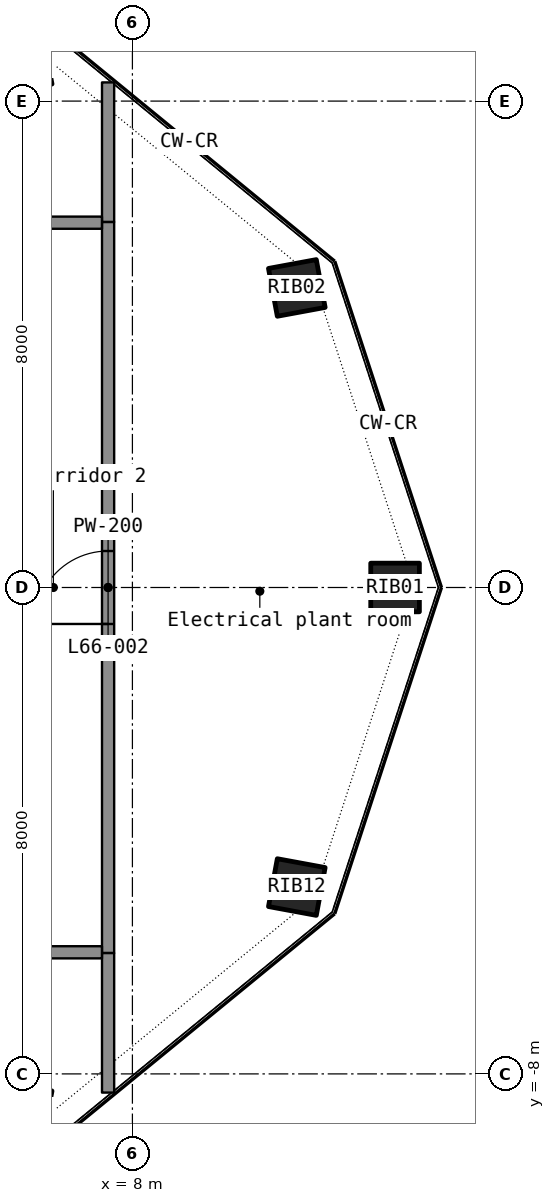
"""IFC4 building model, lengths in metres.
Left out: names, types, materials, properties, quantities, classifications, styles, units other than length and angle.
Written with IfcOpenShell. Run it as: python <this file> out.ifc"""

import sys

from ifc_helpers import new_model, si_unit, direction, frame, frame_2d, origin, origin_2d, place, context, subcontext, project, spatial, rectangle, hollow_rectangle, extrude, element, fill, save


model = new_model("IFC4")
c1 = context("Model", 3, precision=1e-05, world=origin(), true_north=direction((0.0, 1.0)))
c2 = subcontext(c1, "Body", "Model", "MODEL_VIEW")
j1 = project(units=[si_unit("LENGTHUNIT", "METRE"), si_unit("PLANEANGLEUNIT", "RADIAN")], contexts=[c1])
p1 = place(None, origin())
s1 = spatial("IfcSite", under=j1, at=p1, CompositionType="ELEMENT")
p2 = place(p1, origin())
s2 = spatial("IfcBuilding", under=s1, at=p2, CompositionType="ELEMENT")
p3 = place(p2, frame((0.0, 0.0, 272.6)))
s3 = spatial("IfcBuildingStorey", under=s2, at=p3, CompositionType="ELEMENT", Elevation=272.6)
p4 = place(p3, frame((12.32, 0.0, 0.0), z_axis=(-0.136861927, 0.0, 0.990590134), x_axis=(0.0, -1.0, 0.0)))
e1 = element("IfcColumn", 1, at=p4, inside=s3, PredefinedType="COLUMN", context=c2, shape_type="SweptSolid", body=[
    extrude(hollow_rectangle(XDim=0.8, YDim=0.8, WallThickness=0.025, at=origin_2d()), origin(), (0.0, 0.0, 1.0), 3.937),
])
p5 = place(p3, frame((10.704, 4.927, 0.0), z_axis=(-0.1190343, -0.054862524, 0.991373259), x_axis=(0.575106985, -0.817731936, 0.023799935)))
e2 = element("IfcColumn", 2, at=p5, inside=s3, PredefinedType="COLUMN", context=c2, shape_type="SweptSolid", body=[
    extrude(hollow_rectangle(XDim=0.8, YDim=0.8, WallThickness=0.025, at=origin_2d()), origin(), (0.0, 0.0, 1.0), 3.934),
])
for number, where, z_axis, x_axis in (
    (3, (6.211, 8.601, 0.0), (-0.069, -0.096, 0.993), (0.903, -0.428, 0.022)),
    (4, (6.211, -8.601, 0.0), (-0.069, 0.096, 0.993), (-0.903, -0.428, -0.022)),
):
    element("IfcColumn", number, at=place(p3, frame(where, z_axis=z_axis, x_axis=x_axis)), inside=s3, PredefinedType="COLUMN", context=c2, shape_type="SweptSolid", body=[
        extrude(hollow_rectangle(XDim=0.8, YDim=0.8, WallThickness=0.025, at=origin_2d()), origin(), (0.0, 0.0, 1.0), 3.927),
    ])
p6 = place(p3, frame((10.704, -4.927, 0.0), z_axis=(-0.1190343, 0.054862524, 0.991373259), x_axis=(-0.575106985, -0.817731936, -0.023799935)))
e5 = element("IfcColumn", 5, at=p6, inside=s3, PredefinedType="COLUMN", context=c2, shape_type="SweptSolid", body=[
    extrude(hollow_rectangle(XDim=0.8, YDim=0.8, WallThickness=0.025, at=origin_2d()), origin(), (0.0, 0.0, 1.0), 3.934),
])
p7 = place(p3, frame((7.6, -6.012, 0.0), z_axis=(0.0, 0.0, 1.0), x_axis=(0.0, 1.0, 0.0)))
e6 = element("IfcWall", 6, at=p7, inside=s3, PredefinedType="PARTITIONING", context=c2, shape_type="SweptSolid", body=[
    extrude(rectangle(XDim=12.024, YDim=0.2, at=frame_2d((6.012, 0.0))), origin(), (0.0, 0.0, 1.0), 2.9),
])
p8 = place(p7, frame((5.412, 0.0, 0.0)))
e7 = element("IfcOpeningElement", 7, at=p8, cuts=e6, PredefinedType="OPENING", context=c2, shape_type="SweptSolid", body=[
    extrude(rectangle(XDim=1.2, YDim=2.2, at=frame_2d((0.6, 1.1))), frame((0.0, 0.11, 0.0), z_axis=(0.0, -1.0, 0.0), x_axis=(1.0, 0.0, 0.0)), (0.0, 0.0, 1.0), 0.22),
])
for number, where, z_axis, x_axis in (
    (8, (7.6, -6.013, 0.0), (0.0, 0.0, 1.0), (0.0, -1.0, 0.0)),
    (9, (7.6, 8.307, 0.0), (0.0, 0.0, 1.0), (0.0, -1.0, 0.0)),
):
    element("IfcWall", number, at=place(p3, frame(where, z_axis=z_axis, x_axis=x_axis)), inside=s3, PredefinedType="PARTITIONING", context=c2, shape_type="SweptSolid", body=[
        extrude(rectangle(XDim=2.294, YDim=0.2, at=frame_2d((1.147, 0.0))), origin(), (0.0, 0.0, 1.0), 2.9),
    ])
for number, where, z_axis, x_axis in (
    (10, (5.813, -6.0, 0.0), (0.0, 0.0, 1.0), (1.0, 0.0, 0.0)),
    (11, (7.499, 6.0, 0.0), (0.0, 0.0, 1.0), (-1.0, 0.0, 0.0)),
):
    element("IfcWall", number, at=place(p3, frame(where, z_axis=z_axis, x_axis=x_axis)), inside=s3, PredefinedType="PARTITIONING", context=c2, shape_type="SweptSolid", body=[
        extrude(rectangle(XDim=1.686, YDim=0.2, at=frame_2d((0.843, 0.0))), origin(), (0.0, 0.0, 1.0), 2.9),
    ])
p9 = place(p8, origin())
e12 = element("IfcDoor", 12, at=p9, inside=s3, OperationType="DOUBLE_DOOR_SINGLE_SWING", PredefinedType="DOOR", context=c2, shape_type="SweptSolid", body=[
    extrude(rectangle(XDim=1.2, YDim=2.2, at=frame_2d((0.6, 1.1))), frame((0.0, 0.025, 0.0), z_axis=(0.0, -1.0, 0.0), x_axis=(1.0, 0.0, 0.0)), (0.0, 0.0, 1.0), 0.05),
])
fill(e7, e12)
save(model, sys.argv[1])
